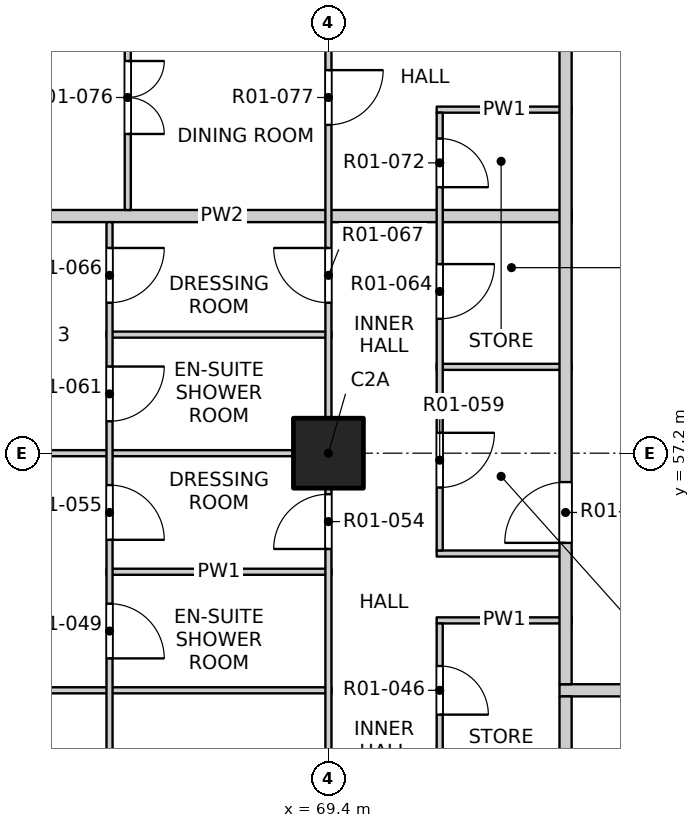
"""IFC4 building model, lengths in metres.
Left out: names, types, materials, properties, quantities, classifications, styles, units other than length and angle.
Written with IfcOpenShell. Run it as: python <this file> out.ifc"""

import sys

from ifc_helpers import new_model, si_unit, direction, frame, frame_2d, origin, origin_2d, place, context, subcontext, project, spatial, rectangle, extrude, element, fill, save


model = new_model("IFC4")
c1 = context("Model", 3, precision=1e-05, world=origin(), true_north=direction((0.0, 1.0)))
c2 = subcontext(c1, "Body", "Model", "MODEL_VIEW")
j1 = project(units=[si_unit("LENGTHUNIT", "METRE"), si_unit("PLANEANGLEUNIT", "RADIAN")], contexts=[c1])
p1 = place(None, origin())
s1 = spatial("IfcSite", under=j1, at=p1, CompositionType="ELEMENT")
p2 = place(p1, origin())
s2 = spatial("IfcBuilding", under=s1, at=p2, CompositionType="ELEMENT")
p3 = place(p2, frame((0.0, 0.0, 26.3)))
s3 = spatial("IfcBuildingStorey", under=s2, at=p3, CompositionType="ELEMENT", Elevation=26.3)
p4 = place(p3, frame((69.4, 57.2, -0.25), z_axis=(0.0, 0.0, 1.0), x_axis=(1.0, 0.0, 0.0)))
e1 = element("IfcColumn", 1, at=p4, inside=s3, PredefinedType="COLUMN", context=c2, shape_type="SweptSolid", body=[
    extrude(rectangle(XDim=1.15, YDim=1.15, at=origin_2d()), origin(), (0.0, 0.0, 1.0), 3.4),
])
p5 = place(p3, frame((61.9, 53.3, 0.0), z_axis=(0.0, 0.0, 1.0), x_axis=(1.0, 0.0, 0.0)))
e2 = element("IfcWall", 2, at=p5, inside=s3, PredefinedType="PARTITIONING", context=c2, shape_type="SweptSolid", body=[
    extrude(rectangle(XDim=7.55, YDim=0.1, at=frame_2d((3.775, 0.0))), origin(), (0.0, 0.0, 1.0), 3.15),
])
p6 = place(p3, frame((73.2, 53.3, 0.0), z_axis=(0.0, 0.0, 1.0), x_axis=(1.0, 0.0, 0.0)))
e3 = element("IfcWall", 3, at=p6, inside=s3, PredefinedType="PARTITIONING", context=c2, shape_type="SweptSolid", body=[
    extrude(rectangle(XDim=23.6, YDim=0.2, at=frame_2d((11.8, 0.0))), origin(), (0.0, 0.0, 1.0), 3.15),
])
p7 = place(p6, frame((6.525, 0.0, 0.0)))
e4 = element("IfcOpeningElement", 4, at=p7, cuts=e3, PredefinedType="OPENING", context=c2, shape_type="SweptSolid", body=[
    extrude(rectangle(XDim=1.0, YDim=2.1, at=frame_2d((0.5, 1.05))), frame((0.0, 0.11, 0.0), z_axis=(0.0, -1.0, 0.0), x_axis=(1.0, 0.0, 0.0)), (0.0, 0.0, 1.0), 0.22),
])
p8 = place(p6, frame((18.275, 0.0, 0.0)))
e5 = element("IfcOpeningElement", 5, at=p8, cuts=e3, PredefinedType="OPENING", context=c2, shape_type="SweptSolid", body=[
    extrude(rectangle(XDim=1.0, YDim=2.1, at=frame_2d((0.5, 1.05))), frame((0.0, 0.11, 0.0), z_axis=(0.0, -1.0, 0.0), x_axis=(1.0, 0.0, 0.0)), (0.0, 0.0, 1.0), 0.22),
])
p9 = place(p3, frame((71.18, 54.45, 0.0), z_axis=(0.0, 0.0, 1.0), x_axis=(1.0, 0.0, 0.0)))
e6 = element("IfcWall", 6, at=p9, inside=s3, PredefinedType="PARTITIONING", context=c2, shape_type="SweptSolid", body=[
    extrude(rectangle(XDim=2.22, YDim=0.1, at=frame_2d((1.11, 0.0))), origin(), (0.0, 0.0, 1.0), 3.15),
])
p10 = place(p3, frame((65.75, 55.25, 0.0), z_axis=(0.0, 0.0, 1.0), x_axis=(1.0, 0.0, 0.0)))
e7 = element("IfcWall", 7, at=p10, inside=s3, PredefinedType="PARTITIONING", context=c2, shape_type="SweptSolid", body=[
    extrude(rectangle(XDim=3.7, YDim=0.1, at=frame_2d((1.85, 0.0))), origin(), (0.0, 0.0, 1.0), 3.15),
])
p11 = place(p3, frame((71.18, 55.55, 0.0), z_axis=(0.0, 0.0, 1.0), x_axis=(1.0, 0.0, 0.0)))
e8 = element("IfcWall", 8, at=p11, inside=s3, PredefinedType="PARTITIONING", context=c2, shape_type="SweptSolid", body=[
    extrude(rectangle(XDim=2.22, YDim=0.1, at=frame_2d((1.11, 0.0))), origin(), (0.0, 0.0, 1.0), 3.15),
])
p12 = place(p3, frame((61.9, 57.2, 0.0), z_axis=(0.0, 0.0, 1.0), x_axis=(1.0, 0.0, 0.0)))
e9 = element("IfcWall", 9, at=p12, inside=s3, PredefinedType="PARTITIONING", context=c2, shape_type="SweptSolid", body=[
    extrude(rectangle(XDim=7.55, YDim=0.1, at=frame_2d((3.775, 0.0))), origin(), (0.0, 0.0, 1.0), 2.55),
])
p13 = place(p3, frame((71.18, 58.62, 0.0), z_axis=(0.0, 0.0, 1.0), x_axis=(1.0, 0.0, 0.0)))
e10 = element("IfcWall", 10, at=p13, inside=s3, PredefinedType="PARTITIONING", context=c2, shape_type="SweptSolid", body=[
    extrude(rectangle(XDim=2.22, YDim=0.1, at=frame_2d((1.11, 0.0))), origin(), (0.0, 0.0, 1.0), 3.15),
])
p14 = place(p3, frame((65.75, 59.15, 0.0), z_axis=(0.0, 0.0, 1.0), x_axis=(1.0, 0.0, 0.0)))
e11 = element("IfcWall", 11, at=p14, inside=s3, PredefinedType="PARTITIONING", context=c2, shape_type="SweptSolid", body=[
    extrude(rectangle(XDim=3.7, YDim=0.1, at=frame_2d((1.85, 0.0))), origin(), (0.0, 0.0, 1.0), 3.15),
])
p15 = place(p3, frame((61.9, 61.1, 0.0), z_axis=(0.0, 0.0, 1.0), x_axis=(1.0, 0.0, 0.0)))
e12 = element("IfcWall", 12, at=p15, inside=s3, PredefinedType="PARTITIONING", context=c2, shape_type="SweptSolid", body=[
    extrude(rectangle(XDim=11.5, YDim=0.2, at=frame_2d((5.75, 0.0))), origin(), (0.0, 0.0, 1.0), 3.15),
])
p16 = place(p3, frame((71.18, 62.85, 0.0), z_axis=(0.0, 0.0, 1.0), x_axis=(1.0, 0.0, 0.0)))
e13 = element("IfcWall", 13, at=p16, inside=s3, PredefinedType="PARTITIONING", context=c2, shape_type="SweptSolid", body=[
    extrude(rectangle(XDim=2.22, YDim=0.1, at=frame_2d((1.11, 0.0))), origin(), (0.0, 0.0, 1.0), 3.15),
])
p17 = place(p3, frame((65.8, 41.9, 0.0), z_axis=(0.0, 0.0, 1.0), x_axis=(0.0, 1.0, 0.0)))
e14 = element("IfcWall", 14, at=p17, inside=s3, PredefinedType="PARTITIONING", context=c2, shape_type="SweptSolid", body=[
    extrude(rectangle(XDim=19.1, YDim=0.1, at=frame_2d((9.55, 0.0))), origin(), (0.0, 0.0, 1.0), 3.15),
])
p18 = place(p17, frame((1.05, 0.0, 0.0)))
e15 = element("IfcOpeningElement", 15, at=p18, cuts=e14, PredefinedType="OPENING", context=c2, shape_type="SweptSolid", body=[
    extrude(rectangle(XDim=1.2, YDim=2.1, at=frame_2d((0.6, 1.05))), frame((0.0, 0.06, 0.0), z_axis=(0.0, -1.0, 0.0), x_axis=(1.0, 0.0, 0.0)), (0.0, 0.0, 1.0), 0.12),
])
p19 = place(p17, frame((4.95, 0.0, 0.0)))
e16 = element("IfcOpeningElement", 16, at=p19, cuts=e14, PredefinedType="OPENING", context=c2, shape_type="SweptSolid", body=[
    extrude(rectangle(XDim=1.2, YDim=2.1, at=frame_2d((0.6, 1.05))), frame((0.0, 0.06, 0.0), z_axis=(0.0, -1.0, 0.0), x_axis=(1.0, 0.0, 0.0)), (0.0, 0.0, 1.0), 0.12),
])
p20 = place(p17, frame((8.85, 0.0, 0.0)))
e17 = element("IfcOpeningElement", 17, at=p20, cuts=e14, PredefinedType="OPENING", context=c2, shape_type="SweptSolid", body=[
    extrude(rectangle(XDim=1.2, YDim=2.1, at=frame_2d((0.6, 1.05))), frame((0.0, 0.06, 0.0), z_axis=(0.0, -1.0, 0.0), x_axis=(1.0, 0.0, 0.0)), (0.0, 0.0, 1.0), 0.12),
])
p21 = place(p17, frame((11.925, 0.0, 0.0)))
e18 = element("IfcOpeningElement", 18, at=p21, cuts=e14, PredefinedType="OPENING", context=c2, shape_type="SweptSolid", body=[
    extrude(rectangle(XDim=0.9, YDim=2.1, at=frame_2d((0.45, 1.05))), frame((0.0, 0.06, 0.0), z_axis=(0.0, -1.0, 0.0), x_axis=(1.0, 0.0, 0.0)), (0.0, 0.0, 1.0), 0.12),
])
p22 = place(p17, frame((13.875, 0.0, 0.0)))
e19 = element("IfcOpeningElement", 19, at=p22, cuts=e14, PredefinedType="OPENING", context=c2, shape_type="SweptSolid", body=[
    extrude(rectangle(XDim=0.9, YDim=2.1, at=frame_2d((0.45, 1.05))), frame((0.0, 0.06, 0.0), z_axis=(0.0, -1.0, 0.0), x_axis=(1.0, 0.0, 0.0)), (0.0, 0.0, 1.0), 0.12),
])
p23 = place(p17, frame((15.825, 0.0, 0.0)))
e20 = element("IfcOpeningElement", 20, at=p23, cuts=e14, PredefinedType="OPENING", context=c2, shape_type="SweptSolid", body=[
    extrude(rectangle(XDim=0.9, YDim=2.1, at=frame_2d((0.45, 1.05))), frame((0.0, 0.06, 0.0), z_axis=(0.0, -1.0, 0.0), x_axis=(1.0, 0.0, 0.0)), (0.0, 0.0, 1.0), 0.12),
])
p24 = place(p17, frame((17.775, 0.0, 0.0)))
e21 = element("IfcOpeningElement", 21, at=p24, cuts=e14, PredefinedType="OPENING", context=c2, shape_type="SweptSolid", body=[
    extrude(rectangle(XDim=0.9, YDim=2.1, at=frame_2d((0.45, 1.05))), frame((0.0, 0.06, 0.0), z_axis=(0.0, -1.0, 0.0), x_axis=(1.0, 0.0, 0.0)), (0.0, 0.0, 1.0), 0.12),
])
p25 = place(p3, frame((66.1, 61.2, 0.0), z_axis=(0.0, 0.0, 1.0), x_axis=(0.0, 1.0, 0.0)))
e22 = element("IfcWall", 22, at=p25, inside=s3, PredefinedType="PARTITIONING", context=c2, shape_type="SweptSolid", body=[
    extrude(rectangle(XDim=7.6, YDim=0.1, at=frame_2d((3.8, 0.0))), origin(), (0.0, 0.0, 1.0), 3.15),
])
p26 = place(p25, frame((1.25, 0.0, 0.0)))
e23 = element("IfcOpeningElement", 23, at=p26, cuts=e22, PredefinedType="OPENING", context=c2, shape_type="SweptSolid", body=[
    extrude(rectangle(XDim=1.2, YDim=2.1, at=frame_2d((0.6, 1.05))), frame((0.0, 0.06, 0.0), z_axis=(0.0, -1.0, 0.0), x_axis=(1.0, 0.0, 0.0)), (0.0, 0.0, 1.0), 0.12),
])
p27 = place(p25, frame((4.325, 0.0, 0.0)))
e24 = element("IfcOpeningElement", 24, at=p27, cuts=e22, PredefinedType="OPENING", context=c2, shape_type="SweptSolid", body=[
    extrude(rectangle(XDim=0.9, YDim=2.1, at=frame_2d((0.45, 1.05))), frame((0.0, 0.06, 0.0), z_axis=(0.0, -1.0, 0.0), x_axis=(1.0, 0.0, 0.0)), (0.0, 0.0, 1.0), 0.12),
])
p28 = place(p25, frame((6.275, 0.0, 0.0)))
e25 = element("IfcOpeningElement", 25, at=p28, cuts=e22, PredefinedType="OPENING", context=c2, shape_type="SweptSolid", body=[
    extrude(rectangle(XDim=0.9, YDim=2.1, at=frame_2d((0.45, 1.05))), frame((0.0, 0.06, 0.0), z_axis=(0.0, -1.0, 0.0), x_axis=(1.0, 0.0, 0.0)), (0.0, 0.0, 1.0), 0.12),
])
p29 = place(p3, frame((69.4, 49.4, 0.0), z_axis=(0.0, 0.0, 1.0), x_axis=(0.0, 1.0, 0.0)))
e26 = element("IfcWall", 26, at=p29, inside=s3, PredefinedType="PARTITIONING", context=c2, shape_type="SweptSolid", body=[
    extrude(rectangle(XDim=31.2, YDim=0.1, at=frame_2d((15.6, 0.0))), origin(), (0.0, 0.0, 1.0), 3.15),
])
p30 = place(p29, frame((1.5, 0.0, 0.0)))
e27 = element("IfcOpeningElement", 27, at=p30, cuts=e26, PredefinedType="OPENING", context=c2, shape_type="SweptSolid", body=[
    extrude(rectangle(XDim=0.9, YDim=2.1, at=frame_2d((0.45, 1.05))), frame((0.0, 0.06, 0.0), z_axis=(0.0, -1.0, 0.0), x_axis=(1.0, 0.0, 0.0)), (0.0, 0.0, 1.0), 0.12),
])
p31 = place(p29, frame((6.225, 0.0, 0.0)))
e28 = element("IfcOpeningElement", 28, at=p31, cuts=e26, PredefinedType="OPENING", context=c2, shape_type="SweptSolid", body=[
    extrude(rectangle(XDim=0.9, YDim=2.1, at=frame_2d((0.45, 1.05))), frame((0.0, 0.06, 0.0), z_axis=(0.0, -1.0, 0.0), x_axis=(1.0, 0.0, 0.0)), (0.0, 0.0, 1.0), 0.12),
])
p32 = place(p29, frame((10.275, 0.0, 0.0)))
e29 = element("IfcOpeningElement", 29, at=p32, cuts=e26, PredefinedType="OPENING", context=c2, shape_type="SweptSolid", body=[
    extrude(rectangle(XDim=0.9, YDim=2.1, at=frame_2d((0.45, 1.05))), frame((0.0, 0.06, 0.0), z_axis=(0.0, -1.0, 0.0), x_axis=(1.0, 0.0, 0.0)), (0.0, 0.0, 1.0), 0.12),
])
p33 = place(p29, frame((13.2, 0.0, 0.0)))
e30 = element("IfcOpeningElement", 30, at=p33, cuts=e26, PredefinedType="OPENING", context=c2, shape_type="SweptSolid", body=[
    extrude(rectangle(XDim=0.9, YDim=2.1, at=frame_2d((0.45, 1.05))), frame((0.0, 0.06, 0.0), z_axis=(0.0, -1.0, 0.0), x_axis=(1.0, 0.0, 0.0)), (0.0, 0.0, 1.0), 0.12),
])
p34 = place(p29, frame((18.075, 0.0, 0.0)))
e31 = element("IfcOpeningElement", 31, at=p34, cuts=e26, PredefinedType="OPENING", context=c2, shape_type="SweptSolid", body=[
    extrude(rectangle(XDim=0.9, YDim=2.1, at=frame_2d((0.45, 1.05))), frame((0.0, 0.06, 0.0), z_axis=(0.0, -1.0, 0.0), x_axis=(1.0, 0.0, 0.0)), (0.0, 0.0, 1.0), 0.12),
])
p35 = place(p29, frame((21.8, 0.0, 0.0)))
e32 = element("IfcOpeningElement", 32, at=p35, cuts=e26, PredefinedType="OPENING", context=c2, shape_type="SweptSolid", body=[
    extrude(rectangle(XDim=0.9, YDim=2.1, at=frame_2d((0.45, 1.05))), frame((0.0, 0.06, 0.0), z_axis=(0.0, -1.0, 0.0), x_axis=(1.0, 0.0, 0.0)), (0.0, 0.0, 1.0), 0.12),
])
p36 = place(p29, frame((24.9, 0.0, 0.0)))
e33 = element("IfcOpeningElement", 33, at=p36, cuts=e26, PredefinedType="OPENING", context=c2, shape_type="SweptSolid", body=[
    extrude(rectangle(XDim=0.9, YDim=2.1, at=frame_2d((0.45, 1.05))), frame((0.0, 0.06, 0.0), z_axis=(0.0, -1.0, 0.0), x_axis=(1.0, 0.0, 0.0)), (0.0, 0.0, 1.0), 0.12),
])
p37 = place(p29, frame((29.6, 0.0, 0.0)))
e34 = element("IfcOpeningElement", 34, at=p37, cuts=e26, PredefinedType="OPENING", context=c2, shape_type="SweptSolid", body=[
    extrude(rectangle(XDim=0.9, YDim=2.1, at=frame_2d((0.45, 1.05))), frame((0.0, 0.06, 0.0), z_axis=(0.0, -1.0, 0.0), x_axis=(1.0, 0.0, 0.0)), (0.0, 0.0, 1.0), 0.12),
])
p38 = place(p3, frame((71.23, 45.55, 0.0), z_axis=(0.0, 0.0, 1.0), x_axis=(0.0, 1.0, 0.0)))
e35 = element("IfcWall", 35, at=p38, inside=s3, PredefinedType="PARTITIONING", context=c2, shape_type="SweptSolid", body=[
    extrude(rectangle(XDim=8.85, YDim=0.1, at=frame_2d((4.425, 0.0))), origin(), (0.0, 0.0, 1.0), 3.15),
])
p39 = place(p38, frame((0.7, 0.0, 0.0)))
e36 = element("IfcOpeningElement", 36, at=p39, cuts=e35, PredefinedType="OPENING", context=c2, shape_type="SweptSolid", body=[
    extrude(rectangle(XDim=0.8, YDim=2.1, at=frame_2d((0.4, 1.05))), frame((0.0, 0.06, 0.0), z_axis=(0.0, -1.0, 0.0), x_axis=(1.0, 0.0, 0.0)), (0.0, 0.0, 1.0), 0.12),
])
p40 = place(p38, frame((2.7, 0.0, 0.0)))
e37 = element("IfcOpeningElement", 37, at=p40, cuts=e35, PredefinedType="OPENING", context=c2, shape_type="SweptSolid", body=[
    extrude(rectangle(XDim=0.9, YDim=2.1, at=frame_2d((0.45, 1.05))), frame((0.0, 0.06, 0.0), z_axis=(0.0, -1.0, 0.0), x_axis=(1.0, 0.0, 0.0)), (0.0, 0.0, 1.0), 0.12),
])
p41 = place(p38, frame((4.925, 0.0, 0.0)))
e38 = element("IfcOpeningElement", 38, at=p41, cuts=e35, PredefinedType="OPENING", context=c2, shape_type="SweptSolid", body=[
    extrude(rectangle(XDim=0.8, YDim=2.1, at=frame_2d((0.4, 1.05))), frame((0.0, 0.06, 0.0), z_axis=(0.0, -1.0, 0.0), x_axis=(1.0, 0.0, 0.0)), (0.0, 0.0, 1.0), 0.12),
])
p42 = place(p38, frame((7.35, 0.0, 0.0)))
e39 = element("IfcOpeningElement", 39, at=p42, cuts=e35, PredefinedType="OPENING", context=c2, shape_type="SweptSolid", body=[
    extrude(rectangle(XDim=0.8, YDim=2.1, at=frame_2d((0.4, 1.05))), frame((0.0, 0.06, 0.0), z_axis=(0.0, -1.0, 0.0), x_axis=(1.0, 0.0, 0.0)), (0.0, 0.0, 1.0), 0.12),
])
p43 = place(p3, frame((71.23, 55.6, 0.0), z_axis=(0.0, 0.0, 1.0), x_axis=(0.0, 1.0, 0.0)))
e40 = element("IfcWall", 40, at=p43, inside=s3, PredefinedType="PARTITIONING", context=c2, shape_type="SweptSolid", body=[
    extrude(rectangle(XDim=7.2, YDim=0.1, at=frame_2d((3.6, 0.0))), origin(), (0.0, 0.0, 1.0), 3.15),
])
p44 = place(p43, frame((1.035, 0.0, 0.0)))
e41 = element("IfcOpeningElement", 41, at=p44, cuts=e40, PredefinedType="OPENING", context=c2, shape_type="SweptSolid", body=[
    extrude(rectangle(XDim=0.9, YDim=2.1, at=frame_2d((0.45, 1.05))), frame((0.0, 0.06, 0.0), z_axis=(0.0, -1.0, 0.0), x_axis=(1.0, 0.0, 0.0)), (0.0, 0.0, 1.0), 0.12),
])
p45 = place(p43, frame((3.81, 0.0, 0.0)))
e42 = element("IfcOpeningElement", 42, at=p45, cuts=e40, PredefinedType="OPENING", context=c2, shape_type="SweptSolid", body=[
    extrude(rectangle(XDim=0.9, YDim=2.1, at=frame_2d((0.45, 1.05))), frame((0.0, 0.06, 0.0), z_axis=(0.0, -1.0, 0.0), x_axis=(1.0, 0.0, 0.0)), (0.0, 0.0, 1.0), 0.12),
])
p46 = place(p43, frame((5.975, 0.0, 0.0)))
e43 = element("IfcOpeningElement", 43, at=p46, cuts=e40, PredefinedType="OPENING", context=c2, shape_type="SweptSolid", body=[
    extrude(rectangle(XDim=0.8, YDim=2.1, at=frame_2d((0.4, 1.05))), frame((0.0, 0.06, 0.0), z_axis=(0.0, -1.0, 0.0), x_axis=(1.0, 0.0, 0.0)), (0.0, 0.0, 1.0), 0.12),
])
p47 = place(p3, frame((73.3, 41.9, 0.0), z_axis=(0.0, 0.0, 1.0), x_axis=(0.0, 1.0, 0.0)))
e44 = element("IfcWall", 44, at=p47, inside=s3, PredefinedType="PARTITIONING", context=c2, shape_type="SweptSolid", body=[
    extrude(rectangle(XDim=11.3, YDim=0.2, at=frame_2d((5.65, 0.0))), origin(), (0.0, 0.0, 1.0), 3.15),
])
p48 = place(p3, frame((73.3, 53.4, 0.0), z_axis=(0.0, 0.0, 1.0), x_axis=(0.0, 1.0, 0.0)))
e45 = element("IfcWall", 45, at=p48, inside=s3, PredefinedType="PARTITIONING", context=c2, shape_type="SweptSolid", body=[
    extrude(rectangle(XDim=31.0, YDim=0.2, at=frame_2d((15.5, 0.0))), origin(), (0.0, 0.0, 1.0), 3.15),
])
p49 = place(p48, frame((2.325, 0.0, 0.0)))
e46 = element("IfcOpeningElement", 46, at=p49, cuts=e45, PredefinedType="OPENING", context=c2, shape_type="SweptSolid", body=[
    extrude(rectangle(XDim=1.0, YDim=2.1, at=frame_2d((0.5, 1.05))), frame((0.0, 0.11, 0.0), z_axis=(0.0, -1.0, 0.0), x_axis=(1.0, 0.0, 0.0)), (0.0, 0.0, 1.0), 0.22),
])
p50 = place(p48, frame((10.725, 0.0, 0.0)))
e47 = element("IfcOpeningElement", 47, at=p50, cuts=e45, PredefinedType="OPENING", context=c2, shape_type="SweptSolid", body=[
    extrude(rectangle(XDim=1.0, YDim=2.1, at=frame_2d((0.5, 1.05))), frame((0.0, 0.11, 0.0), z_axis=(0.0, -1.0, 0.0), x_axis=(1.0, 0.0, 0.0)), (0.0, 0.0, 1.0), 0.22),
])
p51 = place(p48, frame((18.225, 0.0, 0.0)))
e48 = element("IfcOpeningElement", 48, at=p51, cuts=e45, PredefinedType="OPENING", context=c2, shape_type="SweptSolid", body=[
    extrude(rectangle(XDim=1.0, YDim=2.1, at=frame_2d((0.5, 1.05))), frame((0.0, 0.11, 0.0), z_axis=(0.0, -1.0, 0.0), x_axis=(1.0, 0.0, 0.0)), (0.0, 0.0, 1.0), 0.22),
])
p52 = place(p48, frame((25.925, 0.0, 0.0)))
e49 = element("IfcOpeningElement", 49, at=p52, cuts=e45, PredefinedType="OPENING", context=c2, shape_type="SweptSolid", body=[
    extrude(rectangle(XDim=1.0, YDim=2.1, at=frame_2d((0.5, 1.05))), frame((0.0, 0.11, 0.0), z_axis=(0.0, -1.0, 0.0), x_axis=(1.0, 0.0, 0.0)), (0.0, 0.0, 1.0), 0.22),
])
p53 = place(p42, origin())
e50 = element("IfcDoor", 50, at=p53, inside=s3, OperationType="SINGLE_SWING_RIGHT", PredefinedType="DOOR", context=c2, shape_type="SweptSolid", body=[
    extrude(rectangle(XDim=0.8, YDim=2.1, at=frame_2d((0.4, 1.05))), frame((0.0, 0.025, 0.0), z_axis=(0.0, -1.0, 0.0), x_axis=(1.0, 0.0, 0.0)), (0.0, 0.0, 1.0), 0.05),
])
fill(e39, e50)
p54 = place(p21, origin())
e51 = element("IfcDoor", 51, at=p54, inside=s3, OperationType="SINGLE_SWING_RIGHT", PredefinedType="DOOR", context=c2, shape_type="SweptSolid", body=[
    extrude(rectangle(XDim=0.9, YDim=2.1, at=frame_2d((0.45, 1.05))), frame((0.0, 0.025, 0.0), z_axis=(0.0, -1.0, 0.0), x_axis=(1.0, 0.0, 0.0)), (0.0, 0.0, 1.0), 0.05),
])
fill(e18, e51)
p55 = place(p31, origin())
e52 = element("IfcDoor", 52, at=p55, inside=s3, OperationType="SINGLE_SWING_LEFT", PredefinedType="DOOR", context=c2, shape_type="SweptSolid", body=[
    extrude(rectangle(XDim=0.9, YDim=2.1, at=frame_2d((0.45, 1.05))), frame((0.0, 0.025, 0.0), z_axis=(0.0, -1.0, 0.0), x_axis=(1.0, 0.0, 0.0)), (0.0, 0.0, 1.0), 0.05),
])
fill(e28, e52)
p56 = place(p22, origin())
e53 = element("IfcDoor", 53, at=p56, inside=s3, OperationType="SINGLE_SWING_RIGHT", PredefinedType="DOOR", context=c2, shape_type="SweptSolid", body=[
    extrude(rectangle(XDim=0.9, YDim=2.1, at=frame_2d((0.45, 1.05))), frame((0.0, 0.025, 0.0), z_axis=(0.0, -1.0, 0.0), x_axis=(1.0, 0.0, 0.0)), (0.0, 0.0, 1.0), 0.05),
])
fill(e19, e53)
p57 = place(p49, origin())
e54 = element("IfcDoor", 54, at=p57, inside=s3, OperationType="SINGLE_SWING_RIGHT", PredefinedType="DOOR", context=c2, shape_type="SweptSolid", body=[
    extrude(rectangle(XDim=1.0, YDim=2.1, at=frame_2d((0.5, 1.05))), frame((0.0, 0.025, 0.0), z_axis=(0.0, -1.0, 0.0), x_axis=(1.0, 0.0, 0.0)), (0.0, 0.0, 1.0), 0.05),
])
fill(e46, e54)
p58 = place(p44, origin())
e55 = element("IfcDoor", 55, at=p58, inside=s3, OperationType="SINGLE_SWING_LEFT", PredefinedType="DOOR", context=c2, shape_type="SweptSolid", body=[
    extrude(rectangle(XDim=0.9, YDim=2.1, at=frame_2d((0.45, 1.05))), frame((0.0, 0.025, 0.0), z_axis=(0.0, -1.0, 0.0), x_axis=(1.0, 0.0, 0.0)), (0.0, 0.0, 1.0), 0.05),
])
fill(e41, e55)
p59 = place(p23, origin())
e56 = element("IfcDoor", 56, at=p59, inside=s3, OperationType="SINGLE_SWING_LEFT", PredefinedType="DOOR", context=c2, shape_type="SweptSolid", body=[
    extrude(rectangle(XDim=0.9, YDim=2.1, at=frame_2d((0.45, 1.05))), frame((0.0, 0.025, 0.0), z_axis=(0.0, -1.0, 0.0), x_axis=(1.0, 0.0, 0.0)), (0.0, 0.0, 1.0), 0.05),
])
fill(e20, e56)
p60 = place(p45, origin())
e57 = element("IfcDoor", 57, at=p60, inside=s3, OperationType="SINGLE_SWING_LEFT", PredefinedType="DOOR", context=c2, shape_type="SweptSolid", body=[
    extrude(rectangle(XDim=0.9, YDim=2.1, at=frame_2d((0.45, 1.05))), frame((0.0, 0.025, 0.0), z_axis=(0.0, -1.0, 0.0), x_axis=(1.0, 0.0, 0.0)), (0.0, 0.0, 1.0), 0.05),
])
fill(e42, e57)
p61 = place(p24, origin())
e58 = element("IfcDoor", 58, at=p61, inside=s3, OperationType="SINGLE_SWING_LEFT", PredefinedType="DOOR", context=c2, shape_type="SweptSolid", body=[
    extrude(rectangle(XDim=0.9, YDim=2.1, at=frame_2d((0.45, 1.05))), frame((0.0, 0.025, 0.0), z_axis=(0.0, -1.0, 0.0), x_axis=(1.0, 0.0, 0.0)), (0.0, 0.0, 1.0), 0.05),
])
fill(e21, e58)
p62 = place(p32, origin())
e59 = element("IfcDoor", 59, at=p62, inside=s3, OperationType="SINGLE_SWING_RIGHT", PredefinedType="DOOR", context=c2, shape_type="SweptSolid", body=[
    extrude(rectangle(XDim=0.9, YDim=2.1, at=frame_2d((0.45, 1.05))), frame((0.0, 0.025, 0.0), z_axis=(0.0, -1.0, 0.0), x_axis=(1.0, 0.0, 0.0)), (0.0, 0.0, 1.0), 0.05),
])
fill(e29, e59)
p63 = place(p46, origin())
e60 = element("IfcDoor", 60, at=p63, inside=s3, OperationType="SINGLE_SWING_RIGHT", PredefinedType="DOOR", context=c2, shape_type="SweptSolid", body=[
    extrude(rectangle(XDim=0.8, YDim=2.1, at=frame_2d((0.4, 1.05))), frame((0.0, 0.025, 0.0), z_axis=(0.0, -1.0, 0.0), x_axis=(1.0, 0.0, 0.0)), (0.0, 0.0, 1.0), 0.05),
])
fill(e43, e60)
p64 = place(p26, origin())
e61 = element("IfcDoor", 61, at=p64, inside=s3, OperationType="DOUBLE_DOOR_SINGLE_SWING", PredefinedType="DOOR", context=c2, shape_type="SweptSolid", body=[
    extrude(rectangle(XDim=1.2, YDim=2.1, at=frame_2d((0.6, 1.05))), frame((0.0, 0.025, 0.0), z_axis=(0.0, -1.0, 0.0), x_axis=(1.0, 0.0, 0.0)), (0.0, 0.0, 1.0), 0.05),
])
fill(e23, e61)
p65 = place(p33, origin())
e62 = element("IfcDoor", 62, at=p65, inside=s3, OperationType="SINGLE_SWING_LEFT", PredefinedType="DOOR", context=c2, shape_type="SweptSolid", body=[
    extrude(rectangle(XDim=0.9, YDim=2.1, at=frame_2d((0.45, 1.05))), frame((0.0, 0.025, 0.0), z_axis=(0.0, -1.0, 0.0), x_axis=(1.0, 0.0, 0.0)), (0.0, 0.0, 1.0), 0.05),
])
fill(e30, e62)
save(model, sys.argv[1])
